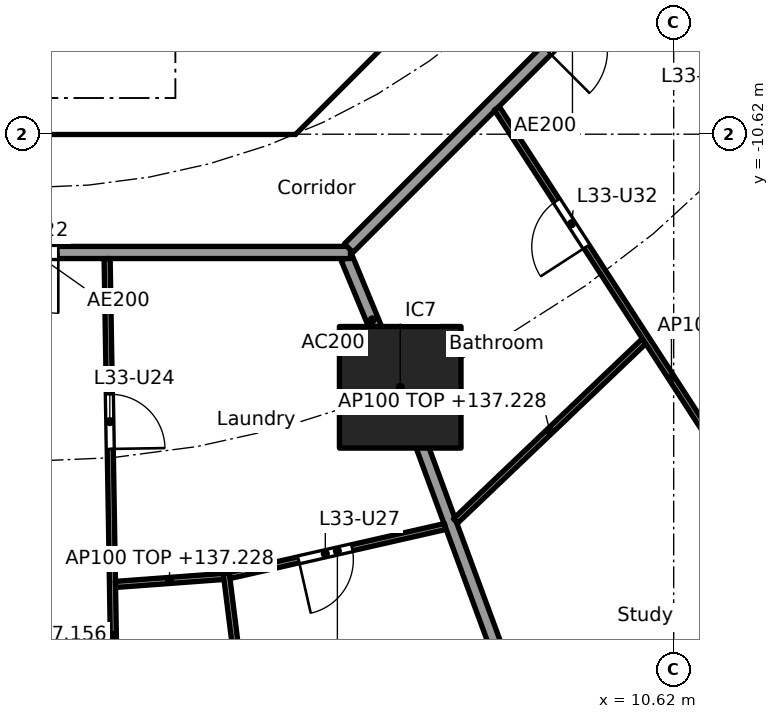
"""IFC4 building model, lengths in metres.
Left out: names, types, materials, properties, quantities, classifications, styles, units other than length and angle.
Written with IfcOpenShell. Run it as: python <this file> out.ifc"""

import sys

from ifc_helpers import new_model, si_unit, direction, frame, frame_2d, origin, origin_2d, place, context, subcontext, project, spatial, polyline, rectangle, outline, extrude, element, fill, save


model = new_model("IFC4")
c1 = context("Model", 3, precision=1e-05, world=origin(), true_north=direction((0.0, 1.0)))
c2 = subcontext(c1, "Body", "Model", "MODEL_VIEW")
j1 = project(units=[si_unit("LENGTHUNIT", "METRE"), si_unit("PLANEANGLEUNIT", "RADIAN")], contexts=[c1])
p1 = place(None, origin())
s1 = spatial("IfcSite", under=j1, at=p1, CompositionType="ELEMENT")
p2 = place(p1, origin())
s2 = spatial("IfcBuilding", under=s1, at=p2, CompositionType="ELEMENT")
p3 = place(p2, frame((0.0, 0.0, 134.4)))
s3 = spatial("IfcBuildingStorey", under=s2, at=p3, CompositionType="ELEMENT", Elevation=134.4)
p4 = place(p3, frame((6.123, -14.782, 0.0), z_axis=(0.0, 0.0, 1.0), x_axis=(1.0, 0.0, 0.0)))
e1 = element("IfcColumn", 1, at=p4, inside=s3, PredefinedType="COLUMN", context=c2, shape_type="SweptSolid", body=[
    extrude(rectangle(XDim=2.0, YDim=2.0, at=origin_2d()), origin(), (0.0, 0.0, 1.0), 3.7),
])
p5 = place(p3, frame((4.613, -9.988, 0.0), z_axis=(0.0, 0.0, 1.0), x_axis=(0.707106781187, 0.707106781187, 0.0)))
e2 = element("IfcWall", 2, at=p5, inside=s3, PredefinedType="SHEAR", context=c2, shape_type="SweptSolid", body=[
    extrude(rectangle(XDim=7.602, YDim=0.6, at=frame_2d((3.801, 0.0))), origin(), (0.0, 0.0, 1.0), 3.44),
])
p6 = place(p5, frame((3.201, 0.0, 0.0)))
e3 = element("IfcOpeningElement", 3, at=p6, cuts=e2, PredefinedType="OPENING", context=c2, shape_type="SweptSolid", body=[
    extrude(rectangle(XDim=1.2, YDim=2.1, at=frame_2d((0.6, 1.05))), frame((0.0, 0.31, 0.0), z_axis=(0.0, -1.0, 0.0), x_axis=(1.0, 0.0, 0.0)), (0.0, 0.0, 1.0), 0.62),
])
p7 = place(p3, frame((4.0, -10.025, 0.0), z_axis=(0.0, 0.0, 1.0), x_axis=(0.0, 1.0, 0.0)))
e4 = element("IfcWall", 4, at=p7, inside=s3, PredefinedType="SOLIDWALL", context=c2, shape_type="SweptSolid", body=[
    extrude(rectangle(XDim=3.0, YDim=0.2, at=frame_2d((1.5, 0.0))), origin(), (0.0, 0.0, 1.0), 3.44),
])
p8 = place(p7, frame((0.975, 0.0, 0.0)))
e5 = element("IfcOpeningElement", 5, at=p8, cuts=e4, PredefinedType="OPENING", context=c2, shape_type="SweptSolid", body=[
    extrude(rectangle(XDim=1.1, YDim=2.1, at=frame_2d((0.55, 1.05))), frame((0.0, 0.11, 0.0), z_axis=(0.0, -1.0, 0.0), x_axis=(1.0, 0.0, 0.0)), (0.0, 0.0, 1.0), 0.22),
])
p9 = place(p3, origin())
e6 = element("IfcWall", 6, at=p9, inside=s3, PredefinedType="SHEAR", context=c2, shape_type="SweptSolid", body=[
    extrude(outline(polyline([(-4.152, -10.025), (4.152, -10.025), (4.401, -9.776), (4.825, -10.2), (4.401, -10.625), (-4.401, -10.625), (-4.825, -10.2), (-4.401, -9.776), (-4.152, -10.025)])), origin(), (0.0, 0.0, 1.0), 3.44),
])
p10 = place(p3, frame((5.243, -12.657, 0.0), z_axis=(0.0, 0.0, 1.0), x_axis=(0.38273085373, -0.923859888513, 0.0)))
e7 = element("IfcWall", 7, at=p10, inside=s3, PredefinedType="PARTITIONING", context=c2, shape_type="SweptSolid", body=[
    extrude(rectangle(XDim=2.199, YDim=0.2, at=frame_2d((1.1, 0.0))), origin(), (0.0, 0.0, 1.0), 3.44),
])
p11 = place(p3, frame((6.14, -14.829, 0.0), z_axis=(0.0, 0.0, 1.0), x_axis=(0.346169582481, -0.938171956608, 0.0)))
e8 = element("IfcWall", 8, at=p11, inside=s3, PredefinedType="PARTITIONING", context=c2, shape_type="SweptSolid", body=[
    extrude(rectangle(XDim=14.354, YDim=0.2, at=frame_2d((7.177, 0.0))), origin(), (0.0, 0.0, 1.0), 2.828),
])
p12 = place(p3, frame((-5.104, -12.565, 0.0), z_axis=(0.0, 0.0, 1.0), x_axis=(1.0, 0.0, 0.0)))
e9 = element("IfcWall", 9, at=p12, inside=s3, PredefinedType="PARTITIONING", context=c2, shape_type="SweptSolid", body=[
    extrude(rectangle(XDim=10.409, YDim=0.2, at=frame_2d((5.205, 0.0))), origin(), (0.0, 0.0, 1.0), 3.44),
])
p13 = place(p12, frame((4.604, 0.0, 0.0)))
e10 = element("IfcOpeningElement", 10, at=p13, cuts=e9, PredefinedType="OPENING", context=c2, shape_type="SweptSolid", body=[
    extrude(rectangle(XDim=1.0, YDim=2.1, at=frame_2d((0.5, 1.05))), frame((0.0, 0.11, 0.0), z_axis=(0.0, -1.0, 0.0), x_axis=(1.0, 0.0, 0.0)), (0.0, 0.0, 1.0), 0.22),
])
p14 = place(p3, frame((5.275, -12.494, 0.0), z_axis=(0.0, 0.0, 1.0), x_axis=(0.707106781187, 0.707106781187, 0.0)))
e11 = element("IfcWall", 11, at=p14, inside=s3, PredefinedType="PARTITIONING", context=c2, shape_type="SweptSolid", body=[
    extrude(rectangle(XDim=10.409, YDim=0.2, at=frame_2d((5.205, 0.0))), origin(), (0.0, 0.0, 1.0), 3.44),
])
p15 = place(p14, frame((4.604, 0.0, 0.0)))
e12 = element("IfcOpeningElement", 12, at=p15, cuts=e11, PredefinedType="OPENING", context=c2, shape_type="SweptSolid", body=[
    extrude(rectangle(XDim=1.0, YDim=2.1, at=frame_2d((0.5, 1.05))), frame((0.0, 0.11, 0.0), z_axis=(0.0, -1.0, 0.0), x_axis=(1.0, 0.0, 0.0)), (0.0, 0.0, 1.0), 0.22),
])
p16 = place(p3, frame((1.303, -12.665, 0.0), z_axis=(0.0, 0.0, 1.0), x_axis=(0.016444820401, -0.999864774798, 0.0)))
e13 = element("IfcWall", 13, at=p16, inside=s3, PredefinedType="PARTITIONING", context=c2, shape_type="SweptSolid", body=[
    extrude(rectangle(XDim=12.396, YDim=0.1, at=frame_2d((6.198, 0.0))), origin(), (0.0, 0.0, 1.0), 2.756),
])
p17 = place(p16, frame((2.232, 0.0, 0.0)))
e14 = element("IfcOpeningElement", 14, at=p17, cuts=e13, PredefinedType="OPENING", context=c2, shape_type="SweptSolid", body=[
    extrude(rectangle(XDim=0.9, YDim=2.1, at=frame_2d((0.45, 1.05))), frame((0.0, 0.06, 0.0), z_axis=(0.0, -1.0, 0.0), x_axis=(1.0, 0.0, 0.0)), (0.0, 0.0, 1.0), 0.12),
])
p18 = place(p16, frame((8.43, 0.0, 0.0)))
e15 = element("IfcOpeningElement", 15, at=p18, cuts=e13, PredefinedType="OPENING", context=c2, shape_type="SweptSolid", body=[
    extrude(rectangle(XDim=0.9, YDim=2.1, at=frame_2d((0.45, 1.05))), frame((0.0, 0.06, 0.0), z_axis=(0.0, -1.0, 0.0), x_axis=(1.0, 0.0, 0.0)), (0.0, 0.0, 1.0), 0.12),
])
p19 = place(p3, frame((1.441, -18.024, 0.0), z_axis=(0.0, 0.0, 1.0), x_axis=(0.997269623256, 0.073846452388, 0.0)))
e16 = element("IfcWall", 16, at=p19, inside=s3, PredefinedType="PARTITIONING", context=c2, shape_type="SweptSolid", body=[
    extrude(rectangle(XDim=1.782, YDim=0.1, at=frame_2d((0.891, 0.0))), origin(), (0.0, 0.0, 1.0), 2.828),
])
p20 = place(p3, frame((3.262, -17.839, 0.0), z_axis=(0.0, 0.0, 1.0), x_axis=(0.124074750982, -0.992272873845, 0.0)))
e17 = element("IfcWall", 17, at=p20, inside=s3, PredefinedType="PARTITIONING", context=c2, shape_type="SweptSolid", body=[
    extrude(rectangle(XDim=13.516, YDim=0.1, at=frame_2d((6.758, 0.0))), origin(), (0.0, 0.0, 1.0), 2.828),
])
p21 = place(p20, frame((9.811, 0.0, 0.0)))
e18 = element("IfcOpeningElement", 18, at=p21, cuts=e17, PredefinedType="OPENING", context=c2, shape_type="SweptSolid", body=[
    extrude(rectangle(XDim=0.9, YDim=2.1, at=frame_2d((0.45, 1.05))), frame((0.0, 0.06, 0.0), z_axis=(0.0, -1.0, 0.0), x_axis=(1.0, 0.0, 0.0)), (0.0, 0.0, 1.0), 0.12),
])
p22 = place(p3, frame((3.317, -17.878, 0.0), z_axis=(0.0, 0.0, 1.0), x_axis=(0.975095905288, 0.221783623135, 0.0)))
e19 = element("IfcWall", 19, at=p22, inside=s3, PredefinedType="PARTITIONING", context=c2, shape_type="SweptSolid", body=[
    extrude(rectangle(XDim=3.636, YDim=0.1, at=frame_2d((1.818, 0.0))), origin(), (0.0, 0.0, 1.0), 2.828),
])
p23 = place(p22, frame((1.164, 0.0, 0.0)))
e20 = element("IfcOpeningElement", 20, at=p23, cuts=e19, PredefinedType="OPENING", context=c2, shape_type="SweptSolid", body=[
    extrude(rectangle(XDim=0.9, YDim=2.1, at=frame_2d((0.45, 1.05))), frame((0.0, 0.06, 0.0), z_axis=(0.0, -1.0, 0.0), x_axis=(1.0, 0.0, 0.0)), (0.0, 0.0, 1.0), 0.12),
])
p24 = place(p3, frame((7.032, -16.98, 0.0), z_axis=(0.0, 0.0, 1.0), x_axis=(0.723709759148, 0.690104473622, 0.0)))
e21 = element("IfcWall", 21, at=p24, inside=s3, PredefinedType="PARTITIONING", context=c2, shape_type="SweptSolid", body=[
    extrude(rectangle(XDim=4.286, YDim=0.1, at=frame_2d((2.143, 0.0))), origin(), (0.0, 0.0, 1.0), 2.828),
])
p25 = place(p3, frame((7.712, -10.195, 0.0), z_axis=(0.0, 0.0, 1.0), x_axis=(0.543868615753, -0.839170381269, 0.0)))
e22 = element("IfcWall", 22, at=p25, inside=s3, PredefinedType="PARTITIONING", context=c2, shape_type="SweptSolid", body=[
    extrude(rectangle(XDim=10.558, YDim=0.1, at=frame_2d((5.279, 0.0))), origin(), (0.0, 0.0, 1.0), 2.756),
])
p26 = place(p25, frame((1.81, 0.0, 0.0)))
e23 = element("IfcOpeningElement", 23, at=p26, cuts=e22, PredefinedType="OPENING", context=c2, shape_type="SweptSolid", body=[
    extrude(rectangle(XDim=0.9, YDim=2.1, at=frame_2d((0.45, 1.05))), frame((0.0, 0.06, 0.0), z_axis=(0.0, -1.0, 0.0), x_axis=(1.0, 0.0, 0.0)), (0.0, 0.0, 1.0), 0.12),
])
p27 = place(p25, frame((7.064, 0.0, 0.0)))
e24 = element("IfcOpeningElement", 24, at=p27, cuts=e22, PredefinedType="OPENING", context=c2, shape_type="SweptSolid", body=[
    extrude(rectangle(XDim=0.9, YDim=2.1, at=frame_2d((0.45, 1.05))), frame((0.0, 0.06, 0.0), z_axis=(0.0, -1.0, 0.0), x_axis=(1.0, 0.0, 0.0)), (0.0, 0.0, 1.0), 0.12),
])
p28 = place(p3, frame((10.184, -7.727, 0.0), z_axis=(0.0, 0.0, 1.0), x_axis=(0.723635100101, -0.690182759783, 0.0)))
e25 = element("IfcWall", 25, at=p28, inside=s3, PredefinedType="PARTITIONING", context=c2, shape_type="SweptSolid", body=[
    extrude(rectangle(XDim=14.173, YDim=0.1, at=frame_2d((7.086, 0.0))), origin(), (0.0, 0.0, 1.0), 2.756),
])
p29 = place(p28, frame((1.565, 0.0, 0.0)))
e26 = element("IfcOpeningElement", 26, at=p29, cuts=e25, PredefinedType="OPENING", context=c2, shape_type="SweptSolid", body=[
    extrude(rectangle(XDim=0.9, YDim=2.1, at=frame_2d((0.45, 1.05))), frame((0.0, 0.06, 0.0), z_axis=(0.0, -1.0, 0.0), x_axis=(1.0, 0.0, 0.0)), (0.0, 0.0, 1.0), 0.12),
])
p30 = place(p28, frame((6.257, 0.0, 0.0)))
e27 = element("IfcOpeningElement", 27, at=p30, cuts=e25, PredefinedType="OPENING", context=c2, shape_type="SweptSolid", body=[
    extrude(rectangle(XDim=0.9, YDim=2.1, at=frame_2d((0.45, 1.05))), frame((0.0, 0.06, 0.0), z_axis=(0.0, -1.0, 0.0), x_axis=(1.0, 0.0, 0.0)), (0.0, 0.0, 1.0), 0.12),
])
p31 = place(p28, frame((11.328, 0.0, 0.0)))
e28 = element("IfcOpeningElement", 28, at=p31, cuts=e25, PredefinedType="OPENING", context=c2, shape_type="SweptSolid", body=[
    extrude(rectangle(XDim=0.9, YDim=2.1, at=frame_2d((0.45, 1.05))), frame((0.0, 0.06, 0.0), z_axis=(0.0, -1.0, 0.0), x_axis=(1.0, 0.0, 0.0)), (0.0, 0.0, 1.0), 0.12),
])
p32 = place(p13, frame((1.0, 0.0, 0.0), x_axis=(-1.0, 0.0, 0.0)))
e29 = element("IfcDoor", 29, at=p32, inside=s3, OperationType="SINGLE_SWING_LEFT", PredefinedType="DOOR", context=c2, shape_type="SweptSolid", body=[
    extrude(rectangle(XDim=1.0, YDim=2.1, at=frame_2d((0.5, 1.05))), frame((0.0, 0.025, 0.0), z_axis=(0.0, -1.0, 0.0), x_axis=(1.0, 0.0, 0.0)), (0.0, 0.0, 1.0), 0.05),
])
fill(e10, e29)
p33 = place(p17, origin())
e30 = element("IfcDoor", 30, at=p33, inside=s3, OperationType="SINGLE_SWING_RIGHT", PredefinedType="DOOR", context=c2, shape_type="SweptSolid", body=[
    extrude(rectangle(XDim=0.9, YDim=2.1, at=frame_2d((0.45, 1.05))), frame((0.0, 0.025, 0.0), z_axis=(0.0, -1.0, 0.0), x_axis=(1.0, 0.0, 0.0)), (0.0, 0.0, 1.0), 0.05),
])
fill(e14, e30)
p34 = place(p23, frame((0.9, 0.0, 0.0), x_axis=(-1.0, 0.0, 0.0)))
e31 = element("IfcDoor", 31, at=p34, inside=s3, OperationType="SINGLE_SWING_RIGHT", PredefinedType="DOOR", context=c2, shape_type="SweptSolid", body=[
    extrude(rectangle(XDim=0.9, YDim=2.1, at=frame_2d((0.45, 1.05))), frame((0.0, 0.025, 0.0), z_axis=(0.0, -1.0, 0.0), x_axis=(1.0, 0.0, 0.0)), (0.0, 0.0, 1.0), 0.05),
])
fill(e20, e31)
p35 = place(p26, frame((0.9, 0.0, 0.0), x_axis=(-1.0, 0.0, 0.0)))
e32 = element("IfcDoor", 32, at=p35, inside=s3, OperationType="SINGLE_SWING_LEFT", PredefinedType="DOOR", context=c2, shape_type="SweptSolid", body=[
    extrude(rectangle(XDim=0.9, YDim=2.1, at=frame_2d((0.45, 1.05))), frame((0.0, 0.025, 0.0), z_axis=(0.0, -1.0, 0.0), x_axis=(1.0, 0.0, 0.0)), (0.0, 0.0, 1.0), 0.05),
])
fill(e23, e32)
save(model, sys.argv[1])
